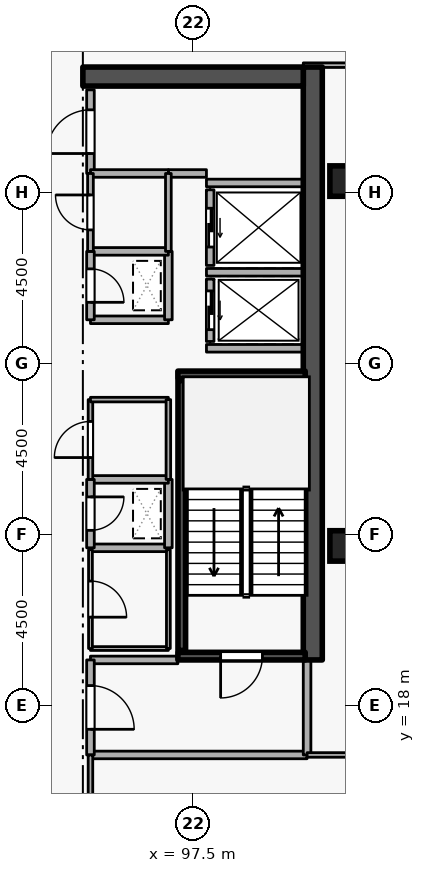
"""IFC4 building model, lengths in metres.
Left out: names, types, materials, properties, quantities, classifications, styles, units other than length and angle.
Written with IfcOpenShell. Run it as: python <this file> out.ifc"""

import sys

from ifc_helpers import new_model, si_unit, direction, frame, frame_2d, origin, origin_2d, place, context, subcontext, project, spatial, rectangle, extrude, element, fill, save


model = new_model("IFC4")
c1 = context("Model", 3, precision=1e-05, world=origin(), true_north=direction((0.0, 1.0)))
c2 = subcontext(c1, "Body", "Model", "MODEL_VIEW")
j1 = project(units=[si_unit("LENGTHUNIT", "METRE"), si_unit("PLANEANGLEUNIT", "RADIAN")], contexts=[c1])
p1 = place(None, origin())
s1 = spatial("IfcSite", under=j1, at=p1, CompositionType="ELEMENT")
p2 = place(p1, origin())
s2 = spatial("IfcBuilding", under=s1, at=p2, CompositionType="ELEMENT")
p3 = place(p2, frame((0.0, 0.0, 261.9)))
s3 = spatial("IfcBuildingStorey", under=s2, at=p3, CompositionType="ELEMENT", Elevation=261.9)
p4 = place(p3, frame((100.65, 19.2, 0.0), z_axis=(0.0, 0.0, 1.0), x_axis=(0.0, 1.0, 0.0)))
e1 = element("IfcWall", 1, at=p4, inside=s3, PredefinedType="SHEAR", context=c2, shape_type="SweptSolid", body=[
    extrude(rectangle(XDim=15.6, YDim=0.5, at=frame_2d((7.8, 0.0))), origin(), (0.0, 0.0, 1.0), 3.6),
])
p5 = place(p3, frame((94.6, 34.55, 0.0), z_axis=(0.0, 0.0, 1.0), x_axis=(1.0, 0.0, 0.0)))
e2 = element("IfcWall", 2, at=p5, inside=s3, PredefinedType="SHEAR", context=c2, shape_type="SweptSolid", body=[
    extrude(rectangle(XDim=5.8, YDim=0.5, at=frame_2d((2.9, 0.0))), origin(), (0.0, 0.0, 1.0), 3.6),
])
for number, where, z_axis, x_axis in (
    (3, (101.5, 22.2, 0.0), (0.0, 0.0, 1.0), (1.0, 0.0, 0.0)),
    (4, (101.5, 31.8, 0.0), (0.0, 0.0, 1.0), (1.0, 0.0, 0.0)),
):
    element("IfcColumn", number, at=place(p3, frame(where, z_axis=z_axis, x_axis=x_axis)), inside=s3, PredefinedType="COLUMN", context=c2, shape_type="SweptSolid", body=[
        extrude(rectangle(XDim=0.8, YDim=0.8, at=origin_2d()), origin(), (0.0, 0.0, 1.0), 3.6),
    ])
p6 = place(p3, frame((97.95, 29.22, 0.0), z_axis=(0.0, 0.0, 1.0), x_axis=(0.0, -1.0, 0.0)))
e5 = element("IfcWall", 5, at=p6, inside=s3, PredefinedType="STANDARD", context=c2, shape_type="SweptSolid", body=[
    extrude(rectangle(XDim=1.64, YDim=0.2, at=frame_2d((0.82, 0.0))), origin(), (0.0, 0.0, 1.0), 3.34),
])
p7 = place(p6, frame((0.31, 0.0, 0.0)))
e6 = element("IfcOpeningElement", 6, at=p7, cuts=e5, PredefinedType="OPENING", context=c2, shape_type="SweptSolid", body=[
    extrude(rectangle(XDim=1.02, YDim=2.06, at=frame_2d((0.51, 1.03))), frame((0.0, 0.11, 0.0), z_axis=(0.0, -1.0, 0.0), x_axis=(1.0, 0.0, 0.0)), (0.0, 0.0, 1.0), 0.22),
])
p8 = place(p3, frame((97.95, 31.57, 0.0), z_axis=(0.0, 0.0, 1.0), x_axis=(0.0, -1.0, 0.0)))
e7 = element("IfcWall", 7, at=p8, inside=s3, PredefinedType="STANDARD", context=c2, shape_type="SweptSolid", body=[
    extrude(rectangle(XDim=1.99, YDim=0.2, at=frame_2d((0.995, 0.0))), origin(), (0.0, 0.0, 1.0), 3.34),
])
p9 = place(p8, frame((0.485, 0.0, 0.0)))
e8 = element("IfcOpeningElement", 8, at=p9, cuts=e7, PredefinedType="OPENING", context=c2, shape_type="SweptSolid", body=[
    extrude(rectangle(XDim=1.02, YDim=2.06, at=frame_2d((0.51, 1.03))), frame((0.0, 0.11, 0.0), z_axis=(0.0, -1.0, 0.0), x_axis=(1.0, 0.0, 0.0)), (0.0, 0.0, 1.0), 0.22),
])
for number, where, z_axis, x_axis in (
    (9, (97.852, 29.4, 0.0), (0.0, 0.0, 1.0), (1.0, 0.0, 0.0)),
    (10, (97.852, 27.4, 0.0), (0.0, 0.0, 1.0), (1.0, 0.0, 0.0)),
    (11, (97.852, 31.75, 0.0), (0.0, 0.0, 1.0), (1.0, 0.0, 0.0)),
):
    element("IfcWall", number, at=place(p3, frame(where, z_axis=z_axis, x_axis=x_axis)), inside=s3, PredefinedType="STANDARD", context=c2, shape_type="SweptSolid", body=[
        extrude(rectangle(XDim=2.536, YDim=0.2, at=frame_2d((1.268, 0.0))), origin(), (0.0, 0.0, 1.0), 3.34),
    ])
p10 = place(p3, frame((100.45, 19.3, 0.0), z_axis=(0.0, 0.0, 1.0), x_axis=(-1.0, 0.0, 0.0)))
e12 = element("IfcWall", 12, at=p10, inside=s3, PredefinedType="SHEAR", context=c2, shape_type="SweptSolid", body=[
    extrude(rectangle(XDim=3.35, YDim=0.2, at=frame_2d((1.675, 0.0))), origin(), (0.0, 0.0, 1.0), 3.6),
])
p11 = place(p10, frame((1.125, 0.0, 0.0)))
e13 = element("IfcOpeningElement", 13, at=p11, cuts=e12, PredefinedType="OPENING", context=c2, shape_type="SweptSolid", body=[
    extrude(rectangle(XDim=1.1, YDim=2.1, at=frame_2d((0.55, 1.05))), frame((0.0, 0.11, 0.0), z_axis=(0.0, -1.0, 0.0), x_axis=(1.0, 0.0, 0.0)), (0.0, 0.0, 1.0), 0.22),
])
p12 = place(p3, frame((97.1, 26.7, 0.0), z_axis=(0.0, 0.0, 1.0), x_axis=(1.0, 0.0, 0.0)))
e14 = element("IfcWall", 14, at=p12, inside=s3, PredefinedType="SHEAR", context=c2, shape_type="SweptSolid", body=[
    extrude(rectangle(XDim=3.35, YDim=0.2, at=frame_2d((1.675, 0.0))), origin(), (0.0, 0.0, 1.0), 3.6),
])
p13 = place(p3, frame((97.203, 26.55, 0.0), z_axis=(0.0, 0.0, 1.0), x_axis=(0.0, -1.0, 0.0)))
e15 = element("IfcWall", 15, at=p13, inside=s3, PredefinedType="SHEAR", context=c2, shape_type="SweptSolid", body=[
    extrude(rectangle(XDim=7.1, YDim=0.2, at=frame_2d((3.55, 0.0))), origin(), (0.0, 0.0, 1.0), 3.6),
])
p14 = place(p3, frame((94.8, 16.7, 0.0), z_axis=(0.0, 0.0, 1.0), x_axis=(1.0, 0.0, 0.0)))
e16 = element("IfcWall", 16, at=p14, inside=s3, PredefinedType="STANDARD", context=c2, shape_type="SweptSolid", body=[
    extrude(rectangle(XDim=5.7, YDim=0.2, at=frame_2d((2.85, 0.0))), origin(), (0.0, 0.0, 1.0), 3.34),
])
p15 = place(p3, frame((100.5, 16.7, 0.0), z_axis=(0.0, 0.0, 1.0), x_axis=(0.0, 1.0, 0.0)))
e17 = element("IfcWall", 17, at=p15, inside=s3, PredefinedType="STANDARD", context=c2, shape_type="SweptSolid", body=[
    extrude(rectangle(XDim=2.5, YDim=0.2, at=frame_2d((1.25, 0.0))), origin(), (0.0, 0.0, 1.0), 3.34),
])
p16 = place(p3, frame((97.1, 19.2, 0.0), z_axis=(0.0, 0.0, 1.0), x_axis=(-1.0, 0.0, 0.0)))
e18 = element("IfcWall", 18, at=p16, inside=s3, PredefinedType="STANDARD", context=c2, shape_type="SweptSolid", body=[
    extrude(rectangle(XDim=2.3, YDim=0.2, at=frame_2d((1.15, 0.0))), origin(), (0.0, 0.0, 1.0), 2.545),
])
p17 = place(p3, frame((94.8, 19.2, 0.0), z_axis=(0.0, 0.0, 1.0), x_axis=(0.0, -1.0, 0.0)))
e19 = element("IfcWall", 19, at=p17, inside=s3, PredefinedType="STANDARD", context=c2, shape_type="SweptSolid", body=[
    extrude(rectangle(XDim=2.5, YDim=0.2, at=frame_2d((1.25, 0.0))), origin(), (0.0, 0.0, 1.0), 3.34),
])
p18 = place(p17, frame((0.675, 0.0, 0.0)))
e20 = element("IfcOpeningElement", 20, at=p18, cuts=e19, PredefinedType="OPENING", context=c2, shape_type="SweptSolid", body=[
    extrude(rectangle(XDim=1.15, YDim=2.1, at=frame_2d((0.575, 1.05))), frame((0.0, 0.11, 0.0), z_axis=(0.0, -1.0, 0.0), x_axis=(1.0, 0.0, 0.0)), (0.0, 0.0, 1.0), 0.22),
])
p19 = place(p3, frame((94.8, 28.15, 0.0), z_axis=(0.0, 0.0, 1.0), x_axis=(1.0, 0.0, 0.0)))
e21 = element("IfcWall", 21, at=p19, inside=s3, PredefinedType="STANDARD", context=c2, shape_type="SweptSolid", body=[
    extrude(rectangle(XDim=2.05, YDim=0.2, at=frame_2d((1.025, 0.0))), origin(), (0.0, 0.0, 1.0), 3.34),
])
p20 = place(p3, frame((96.85, 28.15, 0.0), z_axis=(0.0, 0.0, 1.0), x_axis=(0.0, 1.0, 0.0)))
e22 = element("IfcWall", 22, at=p20, inside=s3, PredefinedType="STANDARD", context=c2, shape_type="SweptSolid", body=[
    extrude(rectangle(XDim=1.8, YDim=0.2, at=frame_2d((0.9, 0.0))), origin(), (0.0, 0.0, 1.0), 3.34),
])
p21 = place(p3, frame((96.85, 29.95, 0.0), z_axis=(0.0, 0.0, 1.0), x_axis=(-1.0, 0.0, 0.0)))
e23 = element("IfcWall", 23, at=p21, inside=s3, PredefinedType="STANDARD", context=c2, shape_type="SweptSolid", body=[
    extrude(rectangle(XDim=2.05, YDim=0.2, at=frame_2d((1.025, 0.0))), origin(), (0.0, 0.0, 1.0), 3.34),
])
p22 = place(p3, frame((94.8, 29.95, 0.0), z_axis=(0.0, 0.0, 1.0), x_axis=(0.0, -1.0, 0.0)))
e24 = element("IfcWall", 24, at=p22, inside=s3, PredefinedType="STANDARD", context=c2, shape_type="SweptSolid", body=[
    extrude(rectangle(XDim=1.8, YDim=0.2, at=frame_2d((0.9, 0.0))), origin(), (0.0, 0.0, 1.0), 3.34),
])
p23 = place(p22, frame((0.46, 0.0, 0.0)))
e25 = element("IfcOpeningElement", 25, at=p23, cuts=e24, PredefinedType="OPENING", context=c2, shape_type="SweptSolid", body=[
    extrude(rectangle(XDim=0.88, YDim=2.04, at=frame_2d((0.44, 1.02))), frame((0.0, 0.11, 0.0), z_axis=(0.0, -1.0, 0.0), x_axis=(1.0, 0.0, 0.0)), (0.0, 0.0, 1.0), 0.22),
])
p24 = place(p3, frame((94.8, 22.15, 0.0), z_axis=(0.0, 0.0, 1.0), x_axis=(1.0, 0.0, 0.0)))
e26 = element("IfcWall", 26, at=p24, inside=s3, PredefinedType="STANDARD", context=c2, shape_type="SweptSolid", body=[
    extrude(rectangle(XDim=2.05, YDim=0.2, at=frame_2d((1.025, 0.0))), origin(), (0.0, 0.0, 1.0), 3.34),
])
p25 = place(p3, frame((96.85, 22.15, 0.0), z_axis=(0.0, 0.0, 1.0), x_axis=(0.0, 1.0, 0.0)))
e27 = element("IfcWall", 27, at=p25, inside=s3, PredefinedType="STANDARD", context=c2, shape_type="SweptSolid", body=[
    extrude(rectangle(XDim=1.8, YDim=0.2, at=frame_2d((0.9, 0.0))), origin(), (0.0, 0.0, 1.0), 3.34),
])
p26 = place(p3, frame((96.85, 23.95, 0.0), z_axis=(0.0, 0.0, 1.0), x_axis=(-1.0, 0.0, 0.0)))
e28 = element("IfcWall", 28, at=p26, inside=s3, PredefinedType="STANDARD", context=c2, shape_type="SweptSolid", body=[
    extrude(rectangle(XDim=2.05, YDim=0.2, at=frame_2d((1.025, 0.0))), origin(), (0.0, 0.0, 1.0), 3.34),
])
p27 = place(p3, frame((94.8, 23.95, 0.0), z_axis=(0.0, 0.0, 1.0), x_axis=(0.0, -1.0, 0.0)))
e29 = element("IfcWall", 29, at=p27, inside=s3, PredefinedType="STANDARD", context=c2, shape_type="SweptSolid", body=[
    extrude(rectangle(XDim=1.8, YDim=0.2, at=frame_2d((0.9, 0.0))), origin(), (0.0, 0.0, 1.0), 3.34),
])
p28 = place(p27, frame((0.46, 0.0, 0.0)))
e30 = element("IfcOpeningElement", 30, at=p28, cuts=e29, PredefinedType="OPENING", context=c2, shape_type="SweptSolid", body=[
    extrude(rectangle(XDim=0.88, YDim=2.04, at=frame_2d((0.44, 1.02))), frame((0.0, 0.11, 0.0), z_axis=(0.0, -1.0, 0.0), x_axis=(1.0, 0.0, 0.0)), (0.0, 0.0, 1.0), 0.22),
])
p29 = place(p3, frame((94.8, 32.0, 0.0), z_axis=(0.0, 0.0, 1.0), x_axis=(0.0, 1.0, 0.0)))
e31 = element("IfcWall", 31, at=p29, inside=s3, PredefinedType="STANDARD", context=c2, shape_type="SweptSolid", body=[
    extrude(rectangle(XDim=2.2, YDim=0.2, at=frame_2d((1.1, 0.0))), origin(), (0.0, 0.0, 1.0), 3.34),
])
p30 = place(p29, frame((0.525, 0.0, 0.0)))
e32 = element("IfcOpeningElement", 32, at=p30, cuts=e31, PredefinedType="OPENING", context=c2, shape_type="SweptSolid", body=[
    extrude(rectangle(XDim=1.15, YDim=2.1, at=frame_2d((0.575, 1.05))), frame((0.0, 0.11, 0.0), z_axis=(0.0, -1.0, 0.0), x_axis=(1.0, 0.0, 0.0)), (0.0, 0.0, 1.0), 0.22),
])
p31 = place(p3, frame((97.852, 32.0, 0.0), z_axis=(0.0, 0.0, 1.0), x_axis=(-1.0, 0.0, 0.0)))
e33 = element("IfcWall", 33, at=p31, inside=s3, PredefinedType="STANDARD", context=c2, shape_type="SweptSolid", body=[
    extrude(rectangle(XDim=1.002, YDim=0.2, at=frame_2d((0.501, 0.0))), origin(), (0.0, 0.0, 1.0), 3.34),
])
p32 = place(p3, frame((96.85, 32.0, 0.0), z_axis=(0.0, 0.0, 1.0), x_axis=(-1.0, 0.0, 0.0)))
e34 = element("IfcWall", 34, at=p32, inside=s3, PredefinedType="STANDARD", context=c2, shape_type="SweptSolid", body=[
    extrude(rectangle(XDim=2.05, YDim=0.2, at=frame_2d((1.025, 0.0))), origin(), (0.0, 0.0, 1.0), 3.34),
])
p33 = place(p3, frame((94.8, 19.5, 0.0), z_axis=(0.0, 0.0, 1.0), x_axis=(1.0, 0.0, 0.0)))
e35 = element("IfcWall", 35, at=p33, inside=s3, PredefinedType="PARTITIONING", context=c2, shape_type="SweptSolid", body=[
    extrude(rectangle(XDim=2.05, YDim=0.1, at=frame_2d((1.025, 0.0))), origin(), (0.0, 0.0, 1.0), 2.545),
])
p34 = place(p3, frame((96.85, 19.5, 0.0), z_axis=(0.0, 0.0, 1.0), x_axis=(0.0, 1.0, 0.0)))
e36 = element("IfcWall", 36, at=p34, inside=s3, PredefinedType="PARTITIONING", context=c2, shape_type="SweptSolid", body=[
    extrude(rectangle(XDim=2.6, YDim=0.1, at=frame_2d((1.3, 0.0))), origin(), (0.0, 0.0, 1.0), 3.34),
])
p35 = place(p3, frame((94.8, 22.1, 0.0), z_axis=(0.0, 0.0, 1.0), x_axis=(0.0, -1.0, 0.0)))
e37 = element("IfcWall", 37, at=p35, inside=s3, PredefinedType="PARTITIONING", context=c2, shape_type="SweptSolid", body=[
    extrude(rectangle(XDim=2.6, YDim=0.1, at=frame_2d((1.3, 0.0))), origin(), (0.0, 0.0, 1.0), 3.34),
])
p36 = place(p35, frame((0.825, 0.0, 0.0)))
e38 = element("IfcOpeningElement", 38, at=p36, cuts=e37, PredefinedType="OPENING", context=c2, shape_type="SweptSolid", body=[
    extrude(rectangle(XDim=0.95, YDim=2.1, at=frame_2d((0.475, 1.05))), frame((0.0, 0.06, 0.0), z_axis=(0.0, -1.0, 0.0), x_axis=(1.0, 0.0, 0.0)), (0.0, 0.0, 1.0), 0.12),
])
p37 = place(p3, frame((94.8, 23.95, 0.0), z_axis=(0.0, 0.0, 1.0), x_axis=(0.0, 1.0, 0.0)))
e39 = element("IfcWall", 39, at=p37, inside=s3, PredefinedType="PARTITIONING", context=c2, shape_type="SweptSolid", body=[
    extrude(rectangle(XDim=2.1, YDim=0.12, at=frame_2d((1.05, 0.0))), origin(), (0.0, 0.0, 1.0), 3.34),
])
p38 = place(p37, frame((0.575, 0.0, 0.0)))
e40 = element("IfcOpeningElement", 40, at=p38, cuts=e39, PredefinedType="OPENING", context=c2, shape_type="SweptSolid", body=[
    extrude(rectangle(XDim=0.95, YDim=2.1, at=frame_2d((0.475, 1.05))), frame((0.0, 0.07, 0.0), z_axis=(0.0, -1.0, 0.0), x_axis=(1.0, 0.0, 0.0)), (0.0, 0.0, 1.0), 0.14),
])
p39 = place(p3, frame((94.8, 26.05, 0.0), z_axis=(0.0, 0.0, 1.0), x_axis=(1.0, 0.0, 0.0)))
e41 = element("IfcWall", 41, at=p39, inside=s3, PredefinedType="PARTITIONING", context=c2, shape_type="SweptSolid", body=[
    extrude(rectangle(XDim=2.05, YDim=0.12, at=frame_2d((1.025, 0.0))), origin(), (0.0, 0.0, 1.0), 3.34),
])
p40 = place(p3, frame((96.85, 26.05, 0.0), z_axis=(0.0, 0.0, 1.0), x_axis=(0.0, -1.0, 0.0)))
e42 = element("IfcWall", 42, at=p40, inside=s3, PredefinedType="PARTITIONING", context=c2, shape_type="SweptSolid", body=[
    extrude(rectangle(XDim=2.1, YDim=0.12, at=frame_2d((1.05, 0.0))), origin(), (0.0, 0.0, 1.0), 3.34),
])
p41 = place(p3, frame((94.8, 29.95, 0.0), z_axis=(0.0, 0.0, 1.0), x_axis=(0.0, 1.0, 0.0)))
e43 = element("IfcWall", 43, at=p41, inside=s3, PredefinedType="PARTITIONING", context=c2, shape_type="SweptSolid", body=[
    extrude(rectangle(XDim=2.05, YDim=0.15, at=frame_2d((1.025, 0.0))), origin(), (0.0, 0.0, 1.0), 3.34),
])
p42 = place(p41, frame((0.565, 0.0, 0.0)))
e44 = element("IfcOpeningElement", 44, at=p42, cuts=e43, PredefinedType="OPENING", context=c2, shape_type="SweptSolid", body=[
    extrude(rectangle(XDim=0.92, YDim=2.08, at=frame_2d((0.46, 1.04))), frame((0.0, 0.085, 0.0), z_axis=(0.0, -1.0, 0.0), x_axis=(1.0, 0.0, 0.0)), (0.0, 0.0, 1.0), 0.17),
])
p43 = place(p3, frame((96.85, 32.0, 0.0), z_axis=(0.0, 0.0, 1.0), x_axis=(0.0, -1.0, 0.0)))
e45 = element("IfcWall", 45, at=p43, inside=s3, PredefinedType="PARTITIONING", context=c2, shape_type="SweptSolid", body=[
    extrude(rectangle(XDim=2.05, YDim=0.15, at=frame_2d((1.025, 0.0))), origin(), (0.0, 0.0, 1.0), 3.34),
])
p44 = place(p3, frame((112.22, 34.85, 0.0), z_axis=(0.0, 0.0, 1.0), x_axis=(-1.0, 0.0, 0.0)))
e46 = element("IfcWall", 46, at=p44, inside=s3, PredefinedType="PARTITIONING", context=c2, shape_type="SweptSolid", body=[
    extrude(rectangle(XDim=11.82, YDim=0.12, at=frame_2d((5.91, 0.0))), origin(), (0.0, 0.0, 1.0), 2.545),
])
p45 = place(p3, frame((94.8, 14.75, 0.0), z_axis=(0.0, 0.0, 1.0), x_axis=(0.0, 1.0, 0.0)))
e47 = element("IfcWall", 47, at=p45, inside=s3, PredefinedType="PARTITIONING", context=c2, shape_type="SweptSolid", body=[
    extrude(rectangle(XDim=1.95, YDim=0.12, at=frame_2d((0.975, 0.0))), origin(), (0.0, 0.0, 1.0), 3.34),
])
p46 = place(p3, frame((100.5, 16.7, 0.0), z_axis=(0.0, 0.0, 1.0), x_axis=(1.0, 0.0, 0.0)))
e48 = element("IfcWall", 48, at=p46, inside=s3, PredefinedType="PARTITIONING", context=c2, shape_type="SweptSolid", body=[
    extrude(rectangle(XDim=11.72, YDim=0.12, at=frame_2d((5.86, 0.0))), origin(), (0.0, 0.0, 1.0), 3.34),
])
p47 = place(p7, origin())
e49 = element("IfcDoor", 49, at=p47, inside=s3, OperationType="SLIDING_TO_LEFT", PredefinedType="DOOR", context=c2, shape_type="SweptSolid", body=[
    extrude(rectangle(XDim=1.02, YDim=2.06, at=frame_2d((0.51, 1.03))), frame((0.0, 0.025, 0.0), z_axis=(0.0, -1.0, 0.0), x_axis=(1.0, 0.0, 0.0)), (0.0, 0.0, 1.0), 0.05),
])
fill(e6, e49)
p48 = place(p9, origin())
e50 = element("IfcDoor", 50, at=p48, inside=s3, OperationType="SLIDING_TO_LEFT", PredefinedType="DOOR", context=c2, shape_type="SweptSolid", body=[
    extrude(rectangle(XDim=1.02, YDim=2.06, at=frame_2d((0.51, 1.03))), frame((0.0, 0.025, 0.0), z_axis=(0.0, -1.0, 0.0), x_axis=(1.0, 0.0, 0.0)), (0.0, 0.0, 1.0), 0.05),
])
fill(e8, e50)
p49 = place(p11, origin())
e51 = element("IfcDoor", 51, at=p49, inside=s3, OperationType="SINGLE_SWING_RIGHT", PredefinedType="DOOR", context=c2, shape_type="SweptSolid", body=[
    extrude(rectangle(XDim=1.1, YDim=2.1, at=frame_2d((0.55, 1.05))), frame((0.0, 0.025, 0.0), z_axis=(0.0, -1.0, 0.0), x_axis=(1.0, 0.0, 0.0)), (0.0, 0.0, 1.0), 0.05),
])
fill(e13, e51)
p50 = place(p18, origin())
e52 = element("IfcDoor", 52, at=p50, inside=s3, OperationType="SINGLE_SWING_RIGHT", PredefinedType="DOOR", context=c2, shape_type="SweptSolid", body=[
    extrude(rectangle(XDim=1.15, YDim=2.1, at=frame_2d((0.575, 1.05))), frame((0.0, 0.025, 0.0), z_axis=(0.0, -1.0, 0.0), x_axis=(1.0, 0.0, 0.0)), (0.0, 0.0, 1.0), 0.05),
])
fill(e20, e52)
p51 = place(p23, origin())
e53 = element("IfcDoor", 53, at=p51, inside=s3, OperationType="SINGLE_SWING_RIGHT", PredefinedType="DOOR", context=c2, shape_type="SweptSolid", body=[
    extrude(rectangle(XDim=0.88, YDim=2.04, at=frame_2d((0.44, 1.02))), frame((0.0, 0.025, 0.0), z_axis=(0.0, -1.0, 0.0), x_axis=(1.0, 0.0, 0.0)), (0.0, 0.0, 1.0), 0.05),
])
fill(e25, e53)
p52 = place(p28, origin())
e54 = element("IfcDoor", 54, at=p52, inside=s3, OperationType="SINGLE_SWING_LEFT", PredefinedType="DOOR", context=c2, shape_type="SweptSolid", body=[
    extrude(rectangle(XDim=0.88, YDim=2.04, at=frame_2d((0.44, 1.02))), frame((0.0, 0.025, 0.0), z_axis=(0.0, -1.0, 0.0), x_axis=(1.0, 0.0, 0.0)), (0.0, 0.0, 1.0), 0.05),
])
fill(e30, e54)
p53 = place(p36, origin())
e55 = element("IfcDoor", 55, at=p53, inside=s3, OperationType="SINGLE_SWING_RIGHT", PredefinedType="DOOR", context=c2, shape_type="SweptSolid", body=[
    extrude(rectangle(XDim=0.95, YDim=2.1, at=frame_2d((0.475, 1.05))), frame((0.0, 0.025, 0.0), z_axis=(0.0, -1.0, 0.0), x_axis=(1.0, 0.0, 0.0)), (0.0, 0.0, 1.0), 0.05),
])
fill(e38, e55)
p54 = place(p38, origin())
e56 = element("IfcDoor", 56, at=p54, inside=s3, OperationType="SINGLE_SWING_LEFT", PredefinedType="DOOR", context=c2, shape_type="SweptSolid", body=[
    extrude(rectangle(XDim=0.95, YDim=2.1, at=frame_2d((0.475, 1.05))), frame((0.0, 0.025, 0.0), z_axis=(0.0, -1.0, 0.0), x_axis=(1.0, 0.0, 0.0)), (0.0, 0.0, 1.0), 0.05),
])
fill(e40, e56)
p55 = place(p42, origin())
e57 = element("IfcDoor", 57, at=p55, inside=s3, OperationType="SINGLE_SWING_RIGHT", PredefinedType="DOOR", context=c2, shape_type="SweptSolid", body=[
    extrude(rectangle(XDim=0.92, YDim=2.08, at=frame_2d((0.46, 1.04))), frame((0.0, 0.025, 0.0), z_axis=(0.0, -1.0, 0.0), x_axis=(1.0, 0.0, 0.0)), (0.0, 0.0, 1.0), 0.05),
])
fill(e44, e57)
p56 = place(p30, origin())
e58 = element("IfcDoor", 58, at=p56, inside=s3, OperationType="SINGLE_SWING_LEFT", PredefinedType="DOOR", context=c2, shape_type="SweptSolid", body=[
    extrude(rectangle(XDim=1.15, YDim=2.1, at=frame_2d((0.575, 1.05))), frame((0.0, 0.025, 0.0), z_axis=(0.0, -1.0, 0.0), x_axis=(1.0, 0.0, 0.0)), (0.0, 0.0, 1.0), 0.05),
])
fill(e32, e58)
save(model, sys.argv[1])
